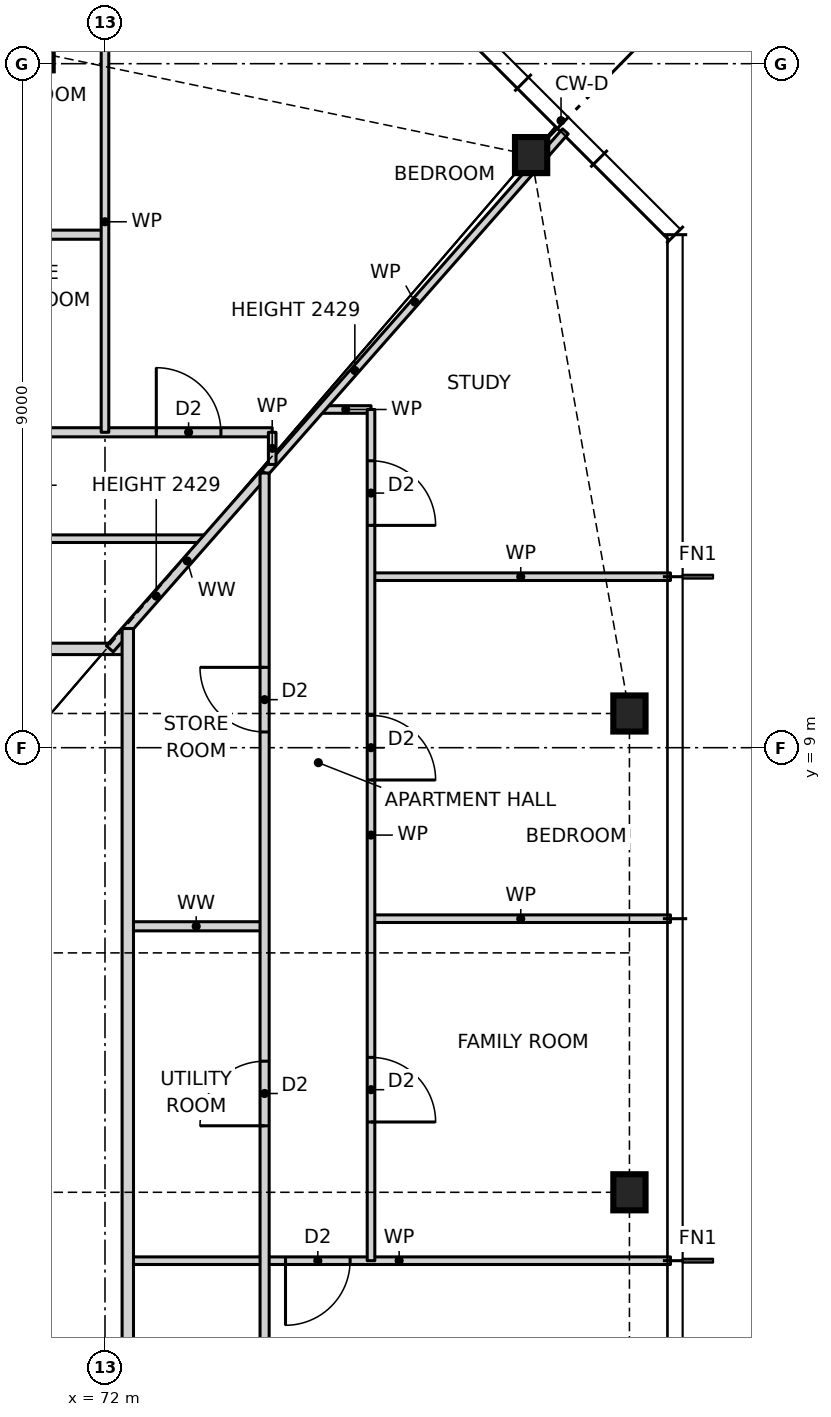
"""IFC4 building model, lengths in metres.
Left out: names, types, materials, properties, quantities, classifications, styles, units other than length and angle.
Written with IfcOpenShell. Run it as: python <this file> out.ifc"""

import sys

from ifc_helpers import new_model, si_unit, direction, frame, frame_2d, origin, origin_2d, place, context, subcontext, project, spatial, rectangle, i_section, extrude, element, fill, save


model = new_model("IFC4")
c1 = context("Model", 3, precision=1e-05, world=origin(), true_north=direction((0.0, 1.0)))
c2 = subcontext(c1, "Body", "Model", "MODEL_VIEW")
j1 = project(units=[si_unit("LENGTHUNIT", "METRE"), si_unit("PLANEANGLEUNIT", "RADIAN")], contexts=[c1])
p1 = place(None, origin())
s1 = spatial("IfcSite", under=j1, at=p1, CompositionType="ELEMENT")
p2 = place(p1, origin())
s2 = spatial("IfcBuilding", under=s1, at=p2, CompositionType="ELEMENT")
p3 = place(p2, frame((0.0, 0.0, 25.5)))
s3 = spatial("IfcBuildingStorey", under=s2, at=p3, CompositionType="ELEMENT", Elevation=25.5)
for number, where, z_axis, x_axis in (
    (1, (78.9, 3.15, 0.0), (0.0, 0.0, 1.0), (1.0, 0.0, 0.0)),
    (2, (78.9, 9.45, 0.0), (0.0, 0.0, 1.0), (1.0, 0.0, 0.0)),
    (3, (77.606, 16.797, 0.0), (0.0, 0.0, 1.0), (1.0, 0.0, 0.0)),
    (4, (71.1, 18.15, 0.0), (0.0, 0.0, 1.0), (1.0, 0.0, 0.0)),
):
    element("IfcColumn", number, at=place(p3, frame(where, z_axis=z_axis, x_axis=x_axis)), inside=s3, PredefinedType="COLUMN", context=c2, shape_type="SweptSolid", body=[
        extrude(i_section(OverallWidth=0.424, OverallDepth=0.475, WebThickness=0.048, FlangeThickness=0.077, at=origin_2d()), origin(), (0.0, 0.0, 1.0), 3.5),
    ])
p4 = place(p3, frame((72.3, 2.25, 0.0), z_axis=(0.0, 0.0, 1.0), x_axis=(1.0, 0.0, 0.0)))
e5 = element("IfcWall", 5, at=p4, inside=s3, PredefinedType="PARTITIONING", context=c2, shape_type="SweptSolid", body=[
    extrude(rectangle(XDim=7.14, YDim=0.1, at=frame_2d((3.57, 0.0))), origin(), (0.0, 0.0, 1.0), 3.27),
])
p5 = place(p4, frame((2.075, 0.0, 0.0)))
e6 = element("IfcOpeningElement", 6, at=p5, cuts=e5, PredefinedType="OPENING", context=c2, shape_type="SweptSolid", body=[
    extrude(rectangle(XDim=0.85, YDim=2.1, at=frame_2d((0.425, 1.05))), frame((0.0, 0.06, 0.0), z_axis=(0.0, -1.0, 0.0), x_axis=(1.0, 0.0, 0.0)), (0.0, 0.0, 1.0), 0.12),
])
p6 = place(p3, frame((72.3, 6.65, 0.0), z_axis=(0.0, 0.0, 1.0), x_axis=(1.0, 0.0, 0.0)))
e7 = element("IfcWall", 7, at=p6, inside=s3, PredefinedType="PARTITIONING", context=c2, shape_type="SweptSolid", body=[
    extrude(rectangle(XDim=1.8, YDim=0.12, at=frame_2d((0.9, 0.0))), origin(), (0.0, 0.0, 1.0), 3.27),
])
p7 = place(p3, frame((75.5, 6.75, 0.0), z_axis=(0.0, 0.0, 1.0), x_axis=(1.0, 0.0, 0.0)))
e8 = element("IfcWall", 8, at=p7, inside=s3, PredefinedType="PARTITIONING", context=c2, shape_type="SweptSolid", body=[
    extrude(rectangle(XDim=3.94, YDim=0.1, at=frame_2d((1.97, 0.0))), origin(), (0.0, 0.0, 1.0), 3.27),
])
p8 = place(p3, frame((53.7, 10.3, 0.0), z_axis=(0.0, 0.0, 1.0), x_axis=(1.0, 0.0, 0.0)))
e9 = element("IfcWall", 9, at=p8, inside=s3, PredefinedType="PARTITIONING", context=c2, shape_type="SweptSolid", body=[
    extrude(rectangle(XDim=18.6, YDim=0.15, at=frame_2d((9.3, 0.0))), origin(), (0.0, 0.0, 1.0), 3.27),
])
p9 = place(p8, frame((8.3, 0.0, 0.0)))
e10 = element("IfcOpeningElement", 10, at=p9, cuts=e9, PredefinedType="OPENING", context=c2, shape_type="SweptSolid", body=[
    extrude(rectangle(XDim=1.0, YDim=2.1, at=frame_2d((0.5, 1.05))), frame((0.0, 0.085, 0.0), z_axis=(0.0, -1.0, 0.0), x_axis=(1.0, 0.0, 0.0)), (0.0, 0.0, 1.0), 0.17),
])
p10 = place(p3, frame((75.5, 11.25, 0.0), z_axis=(0.0, 0.0, 1.0), x_axis=(1.0, 0.0, 0.0)))
e11 = element("IfcWall", 11, at=p10, inside=s3, PredefinedType="PARTITIONING", context=c2, shape_type="SweptSolid", body=[
    extrude(rectangle(XDim=3.94, YDim=0.1, at=frame_2d((1.97, 0.0))), origin(), (0.0, 0.0, 1.0), 3.27),
])
p11 = place(p3, frame((52.66, 11.75, 0.0), z_axis=(0.0, 0.0, 1.0), x_axis=(1.0, 0.0, 0.0)))
e12 = element("IfcWall", 12, at=p11, inside=s3, PredefinedType="PARTITIONING", context=c2, shape_type="SweptSolid", body=[
    extrude(rectangle(XDim=20.68, YDim=0.1, at=frame_2d((10.34, 0.0))), origin(), (0.0, 0.0, 1.0), 3.27),
])
p12 = place(p11, frame((12.615, 0.0, 0.0)))
e13 = element("IfcOpeningElement", 13, at=p12, cuts=e12, PredefinedType="OPENING", context=c2, shape_type="SweptSolid", body=[
    extrude(rectangle(XDim=0.85, YDim=2.1, at=frame_2d((0.425, 1.05))), frame((0.0, 0.06, 0.0), z_axis=(0.0, -1.0, 0.0), x_axis=(1.0, 0.0, 0.0)), (0.0, 0.0, 1.0), 0.12),
])
p13 = place(p11, frame((9.415, 0.0, 0.0)))
e14 = element("IfcOpeningElement", 14, at=p13, cuts=e12, PredefinedType="OPENING", context=c2, shape_type="SweptSolid", body=[
    extrude(rectangle(XDim=0.85, YDim=2.1, at=frame_2d((0.425, 1.05))), frame((0.0, 0.06, 0.0), z_axis=(0.0, -1.0, 0.0), x_axis=(1.0, 0.0, 0.0)), (0.0, 0.0, 1.0), 0.12),
])
p14 = place(p11, frame((17.335, 0.0, 0.0)))
e15 = element("IfcOpeningElement", 15, at=p14, cuts=e12, PredefinedType="OPENING", context=c2, shape_type="SweptSolid", body=[
    extrude(rectangle(XDim=0.85, YDim=2.1, at=frame_2d((0.425, 1.05))), frame((0.0, 0.06, 0.0), z_axis=(0.0, -1.0, 0.0), x_axis=(1.0, 0.0, 0.0)), (0.0, 0.0, 1.0), 0.12),
])
p15 = place(p11, frame((2.495, 0.0, 0.0)))
e16 = element("IfcOpeningElement", 16, at=p15, cuts=e12, PredefinedType="OPENING", context=c2, shape_type="SweptSolid", body=[
    extrude(rectangle(XDim=0.85, YDim=2.1, at=frame_2d((0.425, 1.05))), frame((0.0, 0.06, 0.0), z_axis=(0.0, -1.0, 0.0), x_axis=(1.0, 0.0, 0.0)), (0.0, 0.0, 1.0), 0.12),
])
p16 = place(p3, frame((67.5, 13.15, 0.0), z_axis=(0.0, 0.0, 1.0), x_axis=(1.0, 0.0, 0.0)))
e17 = element("IfcWall", 17, at=p16, inside=s3, PredefinedType="PARTITIONING", context=c2, shape_type="SweptSolid", body=[
    extrude(rectangle(XDim=6.7, YDim=0.12, at=frame_2d((3.35, 0.0))), origin(), (0.0, 0.0, 1.0), 3.27),
])
p17 = place(p16, frame((0.625, 0.0, 0.0)))
e18 = element("IfcOpeningElement", 18, at=p17, cuts=e17, PredefinedType="OPENING", context=c2, shape_type="SweptSolid", body=[
    extrude(rectangle(XDim=0.85, YDim=2.1, at=frame_2d((0.425, 1.05))), frame((0.0, 0.07, 0.0), z_axis=(0.0, -1.0, 0.0), x_axis=(1.0, 0.0, 0.0)), (0.0, 0.0, 1.0), 0.14),
])
p18 = place(p16, frame((5.175, 0.0, 0.0)))
e19 = element("IfcOpeningElement", 19, at=p18, cuts=e17, PredefinedType="OPENING", context=c2, shape_type="SweptSolid", body=[
    extrude(rectangle(XDim=0.85, YDim=2.1, at=frame_2d((0.425, 1.05))), frame((0.0, 0.07, 0.0), z_axis=(0.0, -1.0, 0.0), x_axis=(1.0, 0.0, 0.0)), (0.0, 0.0, 1.0), 0.14),
])
p19 = place(p3, frame((74.836, 13.45, 0.0), z_axis=(0.0, 0.0, 1.0), x_axis=(1.0, 0.0, 0.0)))
e20 = element("IfcWall", 20, at=p19, inside=s3, PredefinedType="PARTITIONING", context=c2, shape_type="SweptSolid", body=[
    extrude(rectangle(XDim=0.664, YDim=0.1, at=frame_2d((0.332, 0.0))), origin(), (0.0, 0.0, 1.0), 3.27),
])
p20 = place(p3, frame((69.6, 15.75, 0.0), z_axis=(0.0, 0.0, 1.0), x_axis=(1.0, 0.0, 0.0)))
e21 = element("IfcWall", 21, at=p20, inside=s3, PredefinedType="PARTITIONING", context=c2, shape_type="SweptSolid", body=[
    extrude(rectangle(XDim=2.4, YDim=0.12, at=frame_2d((1.2, 0.0))), origin(), (0.0, 0.0, 1.0), 3.27),
])
p21 = place(p3, frame((74.1, 12.614, 0.0), z_axis=(0.0, 0.0, 1.0), x_axis=(0.660755619739, 0.750601099775, 0.0)))
e22 = element("IfcWall", 22, at=p21, inside=s3, PredefinedType="PARTITIONING", context=c2, shape_type="SweptSolid", body=[
    extrude(rectangle(XDim=5.989, YDim=0.1, at=frame_2d((2.995, 0.0))), origin(), (0.0, 0.0, 1.0), 2.429),
])
p22 = place(p3, frame((72.063, 10.301, 0.0), z_axis=(0.0, 0.0, 1.0), x_axis=(0.660761820138, 0.750595641506, 0.0)))
e23 = element("IfcWall", 23, at=p22, inside=s3, PredefinedType="PARTITIONING", context=c2, shape_type="SweptSolid", body=[
    extrude(rectangle(XDim=3.082, YDim=0.12, at=frame_2d((1.541, 0.0))), origin(), (0.0, 0.0, 1.0), 2.429),
])
p23 = place(p3, frame((75.5, 2.25, 0.0), z_axis=(0.0, 0.0, 1.0), x_axis=(0.0, 1.0, 0.0)))
e24 = element("IfcWall", 24, at=p23, inside=s3, PredefinedType="PARTITIONING", context=c2, shape_type="SweptSolid", body=[
    extrude(rectangle(XDim=11.2, YDim=0.1, at=frame_2d((5.6, 0.0))), origin(), (0.0, 0.0, 1.0), 3.27),
])
p24 = place(p23, frame((1.825, 0.0, 0.0)))
e25 = element("IfcOpeningElement", 25, at=p24, cuts=e24, PredefinedType="OPENING", context=c2, shape_type="SweptSolid", body=[
    extrude(rectangle(XDim=0.85, YDim=2.1, at=frame_2d((0.425, 1.05))), frame((0.0, 0.06, 0.0), z_axis=(0.0, -1.0, 0.0), x_axis=(1.0, 0.0, 0.0)), (0.0, 0.0, 1.0), 0.12),
])
p25 = place(p23, frame((6.325, 0.0, 0.0)))
e26 = element("IfcOpeningElement", 26, at=p25, cuts=e24, PredefinedType="OPENING", context=c2, shape_type="SweptSolid", body=[
    extrude(rectangle(XDim=0.85, YDim=2.1, at=frame_2d((0.425, 1.05))), frame((0.0, 0.06, 0.0), z_axis=(0.0, -1.0, 0.0), x_axis=(1.0, 0.0, 0.0)), (0.0, 0.0, 1.0), 0.12),
])
p26 = place(p23, frame((9.675, 0.0, 0.0)))
e27 = element("IfcOpeningElement", 27, at=p26, cuts=e24, PredefinedType="OPENING", context=c2, shape_type="SweptSolid", body=[
    extrude(rectangle(XDim=0.85, YDim=2.1, at=frame_2d((0.425, 1.05))), frame((0.0, 0.06, 0.0), z_axis=(0.0, -1.0, 0.0), x_axis=(1.0, 0.0, 0.0)), (0.0, 0.0, 1.0), 0.12),
])
p27 = place(p3, frame((74.2, 12.727, 0.0), z_axis=(0.0, 0.0, 1.0), x_axis=(0.0, 1.0, 0.0)))
e28 = element("IfcWall", 28, at=p27, inside=s3, PredefinedType="PARTITIONING", context=c2, shape_type="SweptSolid", body=[
    extrude(rectangle(XDim=0.423, YDim=0.1, at=frame_2d((0.211, 0.0))), origin(), (0.0, 0.0, 1.0), 3.27),
])
p28 = place(p3, frame((74.1, -12.614, 0.0), z_axis=(0.0, 0.0, 1.0), x_axis=(0.0, 1.0, 0.0)))
e29 = element("IfcWall", 29, at=p28, inside=s3, PredefinedType="PARTITIONING", context=c2, shape_type="SweptSolid", body=[
    extrude(rectangle(XDim=25.228, YDim=0.12, at=frame_2d((12.614, 0.0))), origin(), (0.0, 0.0, 1.0), 3.27),
])
p29 = place(p28, frame((7.239, 0.0, 0.0)))
e30 = element("IfcOpeningElement", 30, at=p29, cuts=e29, PredefinedType="OPENING", context=c2, shape_type="SweptSolid", body=[
    extrude(rectangle(XDim=0.85, YDim=2.1, at=frame_2d((0.425, 1.05))), frame((0.0, 0.07, 0.0), z_axis=(0.0, -1.0, 0.0), x_axis=(1.0, 0.0, 0.0)), (0.0, 0.0, 1.0), 0.14),
])
p30 = place(p28, frame((10.439, 0.0, 0.0)))
e31 = element("IfcOpeningElement", 31, at=p30, cuts=e29, PredefinedType="OPENING", context=c2, shape_type="SweptSolid", body=[
    extrude(rectangle(XDim=0.85, YDim=2.1, at=frame_2d((0.425, 1.05))), frame((0.0, 0.07, 0.0), z_axis=(0.0, -1.0, 0.0), x_axis=(1.0, 0.0, 0.0)), (0.0, 0.0, 1.0), 0.14),
])
p31 = place(p28, frame((2.507, 0.0, 0.0)))
e32 = element("IfcOpeningElement", 32, at=p31, cuts=e29, PredefinedType="OPENING", context=c2, shape_type="SweptSolid", body=[
    extrude(rectangle(XDim=0.85, YDim=2.1, at=frame_2d((0.425, 1.05))), frame((0.0, 0.07, 0.0), z_axis=(0.0, -1.0, 0.0), x_axis=(1.0, 0.0, 0.0)), (0.0, 0.0, 1.0), 0.14),
])
p32 = place(p28, frame((16.639, 0.0, 0.0)))
e33 = element("IfcOpeningElement", 33, at=p32, cuts=e29, PredefinedType="OPENING", context=c2, shape_type="SweptSolid", body=[
    extrude(rectangle(XDim=0.85, YDim=2.1, at=frame_2d((0.425, 1.05))), frame((0.0, 0.07, 0.0), z_axis=(0.0, -1.0, 0.0), x_axis=(1.0, 0.0, 0.0)), (0.0, 0.0, 1.0), 0.14),
])
p33 = place(p28, frame((21.821, 0.0, 0.0)))
e34 = element("IfcOpeningElement", 34, at=p33, cuts=e29, PredefinedType="OPENING", context=c2, shape_type="SweptSolid", body=[
    extrude(rectangle(XDim=0.85, YDim=2.1, at=frame_2d((0.425, 1.05))), frame((0.0, 0.07, 0.0), z_axis=(0.0, -1.0, 0.0), x_axis=(1.0, 0.0, 0.0)), (0.0, 0.0, 1.0), 0.14),
])
p34 = place(p3, frame((72.3, -10.568, 0.0), z_axis=(0.0, 0.0, 1.0), x_axis=(0.0, 1.0, 0.0)))
e35 = element("IfcWall", 35, at=p34, inside=s3, PredefinedType="PARTITIONING", context=c2, shape_type="SweptSolid", body=[
    extrude(rectangle(XDim=21.136, YDim=0.15, at=frame_2d((10.568, 0.0))), origin(), (0.0, 0.0, 1.0), 3.27),
])
p35 = place(p34, frame((8.318, 0.0, 0.0)))
e36 = element("IfcOpeningElement", 36, at=p35, cuts=e35, PredefinedType="OPENING", context=c2, shape_type="SweptSolid", body=[
    extrude(rectangle(XDim=1.0, YDim=2.1, at=frame_2d((0.5, 1.05))), frame((0.0, 0.085, 0.0), z_axis=(0.0, -1.0, 0.0), x_axis=(1.0, 0.0, 0.0)), (0.0, 0.0, 1.0), 0.17),
])
p36 = place(p3, frame((72.0, 13.15, 0.0), z_axis=(0.0, 0.0, 1.0), x_axis=(0.0, 1.0, 0.0)))
e37 = element("IfcWall", 37, at=p36, inside=s3, PredefinedType="PARTITIONING", context=c2, shape_type="SweptSolid", body=[
    extrude(rectangle(XDim=5.54, YDim=0.1, at=frame_2d((2.77, 0.0))), origin(), (0.0, 0.0, 1.0), 3.27),
])
p37 = place(p5, frame((0.85, 0.0, 0.0), z_axis=(0.0, 0.0, 1.0), x_axis=(-1.0, 0.0, 0.0)))
e38 = element("IfcDoor", 38, at=p37, inside=s3, OperationType="SINGLE_SWING_RIGHT", PredefinedType="DOOR", context=c2, shape_type="SweptSolid", body=[
    extrude(rectangle(XDim=0.85, YDim=2.1, at=frame_2d((0.425, 1.05))), frame((0.0, 0.025, 0.0), z_axis=(0.0, -1.0, 0.0), x_axis=(1.0, 0.0, 0.0)), (0.0, 0.0, 1.0), 0.05),
])
fill(e6, e38)
p38 = place(p24, frame((0.85, 0.0, 0.0), z_axis=(0.0, 0.0, 1.0), x_axis=(-1.0, 0.0, 0.0)))
e39 = element("IfcDoor", 39, at=p38, inside=s3, OperationType="SINGLE_SWING_RIGHT", PredefinedType="DOOR", context=c2, shape_type="SweptSolid", body=[
    extrude(rectangle(XDim=0.85, YDim=2.1, at=frame_2d((0.425, 1.05))), frame((0.0, 0.025, 0.0), z_axis=(0.0, -1.0, 0.0), x_axis=(1.0, 0.0, 0.0)), (0.0, 0.0, 1.0), 0.05),
])
fill(e25, e39)
p39 = place(p25, frame((0.85, 0.0, 0.0), z_axis=(0.0, 0.0, 1.0), x_axis=(-1.0, 0.0, 0.0)))
e40 = element("IfcDoor", 40, at=p39, inside=s3, OperationType="SINGLE_SWING_RIGHT", PredefinedType="DOOR", context=c2, shape_type="SweptSolid", body=[
    extrude(rectangle(XDim=0.85, YDim=2.1, at=frame_2d((0.425, 1.05))), frame((0.0, 0.025, 0.0), z_axis=(0.0, -1.0, 0.0), x_axis=(1.0, 0.0, 0.0)), (0.0, 0.0, 1.0), 0.05),
])
fill(e26, e40)
p40 = place(p26, frame((0.85, 0.0, 0.0), z_axis=(0.0, 0.0, 1.0), x_axis=(-1.0, 0.0, 0.0)))
e41 = element("IfcDoor", 41, at=p40, inside=s3, OperationType="SINGLE_SWING_RIGHT", PredefinedType="DOOR", context=c2, shape_type="SweptSolid", body=[
    extrude(rectangle(XDim=0.85, YDim=2.1, at=frame_2d((0.425, 1.05))), frame((0.0, 0.025, 0.0), z_axis=(0.0, -1.0, 0.0), x_axis=(1.0, 0.0, 0.0)), (0.0, 0.0, 1.0), 0.05),
])
fill(e27, e41)
p41 = place(p32, origin())
e42 = element("IfcDoor", 42, at=p41, inside=s3, OperationType="SINGLE_SWING_LEFT", PredefinedType="DOOR", context=c2, shape_type="SweptSolid", body=[
    extrude(rectangle(XDim=0.85, YDim=2.1, at=frame_2d((0.425, 1.05))), frame((0.0, 0.025, 0.0), z_axis=(0.0, -1.0, 0.0), x_axis=(1.0, 0.0, 0.0)), (0.0, 0.0, 1.0), 0.05),
])
fill(e33, e42)
p42 = place(p33, origin())
e43 = element("IfcDoor", 43, at=p42, inside=s3, OperationType="SINGLE_SWING_RIGHT", PredefinedType="DOOR", context=c2, shape_type="SweptSolid", body=[
    extrude(rectangle(XDim=0.85, YDim=2.1, at=frame_2d((0.425, 1.05))), frame((0.0, 0.025, 0.0), z_axis=(0.0, -1.0, 0.0), x_axis=(1.0, 0.0, 0.0)), (0.0, 0.0, 1.0), 0.05),
])
fill(e34, e43)
p43 = place(p18, origin())
e44 = element("IfcDoor", 44, at=p43, inside=s3, OperationType="SINGLE_SWING_LEFT", PredefinedType="DOOR", context=c2, shape_type="SweptSolid", body=[
    extrude(rectangle(XDim=0.85, YDim=2.1, at=frame_2d((0.425, 1.05))), frame((0.0, 0.025, 0.0), z_axis=(0.0, -1.0, 0.0), x_axis=(1.0, 0.0, 0.0)), (0.0, 0.0, 1.0), 0.05),
])
fill(e19, e44)
save(model, sys.argv[1])
